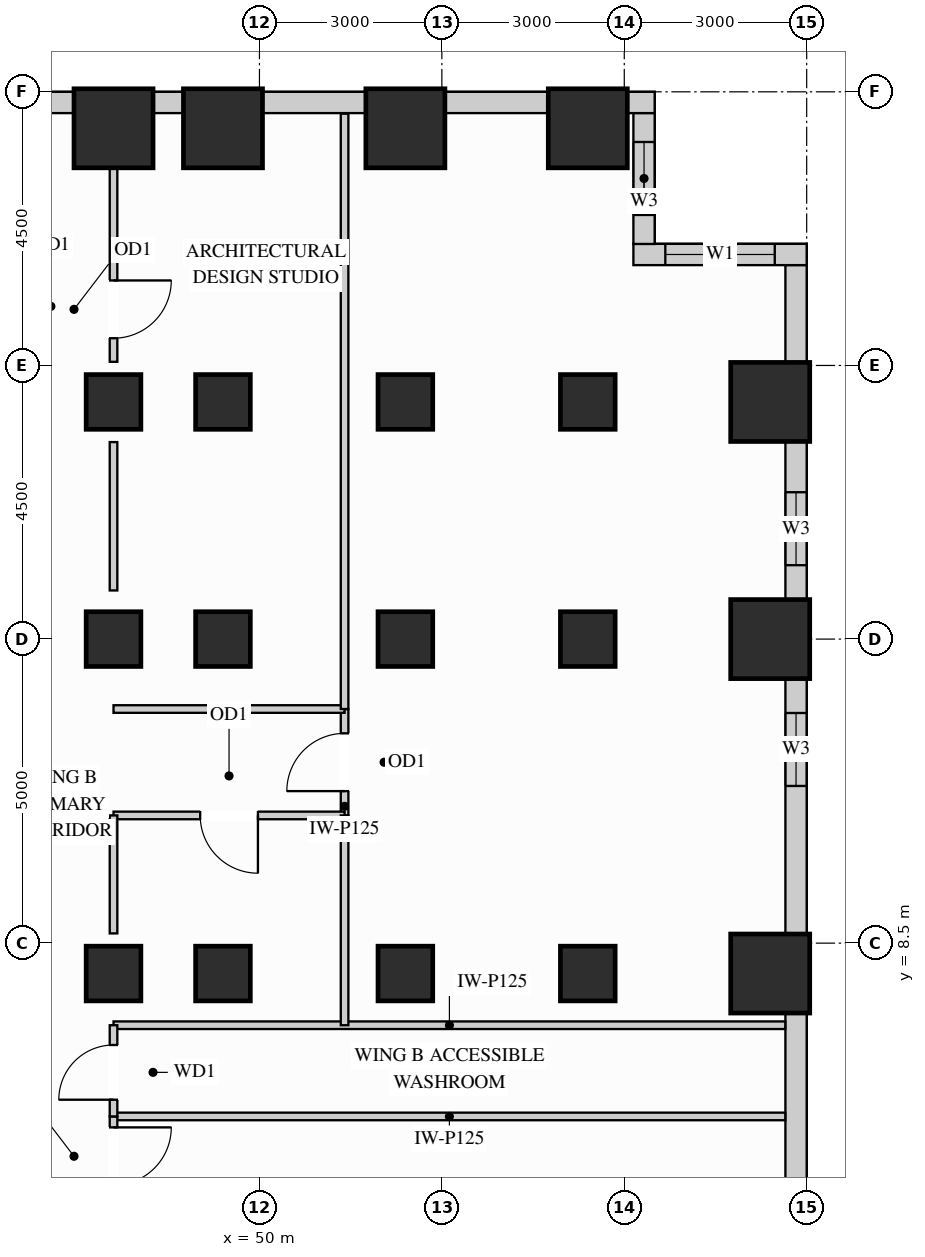
"""IFC4 building model, lengths in metres.
Left out: names, types, materials, properties, quantities, classifications, styles, units other than length and angle.
Written with IfcOpenShell. Run it as: python <this file> out.ifc"""

import sys

from ifc_helpers import new_model, si_unit, direction, frame, frame_2d, origin, origin_2d, place, context, subcontext, project, spatial, rectangle, extrude, source, transform, mapped, element, fill, save


model = new_model("IFC4")
c1 = context("Model", 3, precision=1e-05, world=origin(), true_north=direction((0.0, 1.0)))
c2 = subcontext(c1, "Body", "Model", "MODEL_VIEW")
j1 = project(units=[si_unit("LENGTHUNIT", "METRE"), si_unit("PLANEANGLEUNIT", "RADIAN")], contexts=[c1])
p1 = place(None, origin())
s1 = spatial("IfcSite", under=j1, at=p1, CompositionType="ELEMENT")
p2 = place(p1, origin())
s2 = spatial("IfcBuilding", under=s1, at=p2, CompositionType="ELEMENT")
p3 = place(p2, frame((0.0, 0.0, 26.1)))
s3 = spatial("IfcBuildingStorey", under=s2, at=p3, CompositionType="ELEMENT", Elevation=26.1)
m1 = source(origin(), c2, "Body", "SweptSolid", [
    extrude(rectangle(XDim=0.9, YDim=0.9, at=origin_2d()), origin(), (0.0, 0.0, 1.0), 3.38),
])
for number, where, z_axis, x_axis in (
    (1, (47.6, 13.5, 0.0), (0.0, 0.0, 1.0), (1.0, 0.0, 0.0)),
    (2, (47.6, 8.0, 0.0), (0.0, 0.0, 1.0), (1.0, 0.0, 0.0)),
    (3, (47.6, 17.4, 0.0), (0.0, 0.0, 1.0), (1.0, 0.0, 0.0)),
    (4, (49.4, 13.5, 0.0), (0.0, 0.0, 1.0), (1.0, 0.0, 0.0)),
    (5, (49.4, 17.4, 0.0), (0.0, 0.0, 1.0), (1.0, 0.0, 0.0)),
    (6, (49.4, 8.0, 0.0), (0.0, 0.0, 1.0), (1.0, 0.0, 0.0)),
    (7, (52.4, 13.5, 0.0), (0.0, 0.0, 1.0), (1.0, 0.0, 0.0)),
    (8, (52.4, 17.4, 0.0), (0.0, 0.0, 1.0), (1.0, 0.0, 0.0)),
    (9, (52.4, 8.0, 0.0), (0.0, 0.0, 1.0), (1.0, 0.0, 0.0)),
    (10, (55.4, 13.5, 0.0), (0.0, 0.0, 1.0), (1.0, 0.0, 0.0)),
    (11, (55.4, 17.4, 0.0), (0.0, 0.0, 1.0), (1.0, 0.0, 0.0)),
    (12, (55.4, 8.0, 0.0), (0.0, 0.0, 1.0), (1.0, 0.0, 0.0)),
):
    element("IfcColumn", number, at=place(p3, frame(where, z_axis=z_axis, x_axis=x_axis)), inside=s3, PredefinedType="COLUMN", context=c2, shape_type="MappedRepresentation", body=[
        mapped(m1, transform((0.0, 0.0, 0.0), x_axis=(1.0, 0.0, 0.0), y_axis=(0.0, 1.0, 0.0), z_axis=(0.0, 0.0, 1.0))),
    ])
m2 = source(origin(), c2, "Body", "SweptSolid", [
    extrude(rectangle(XDim=1.3, YDim=1.3, at=origin_2d()), origin(), (0.0, 0.0, 1.0), 3.38),
])
for number, where, z_axis, x_axis in (
    (13, (47.6, 21.9, 0.0), (0.0, 0.0, 1.0), (1.0, 0.0, 0.0)),
    (14, (49.4, 21.9, 0.0), (0.0, 0.0, 1.0), (1.0, 0.0, 0.0)),
    (15, (52.4, 21.9, 0.0), (0.0, 0.0, 1.0), (1.0, 0.0, 0.0)),
    (16, (55.4, 21.9, 0.0), (0.0, 0.0, 1.0), (1.0, 0.0, 0.0)),
    (17, (58.4, 13.5, 0.0), (0.0, 0.0, 1.0), (1.0, 0.0, 0.0)),
    (18, (58.4, 17.4, 0.0), (0.0, 0.0, 1.0), (1.0, 0.0, 0.0)),
    (19, (58.4, 8.0, 0.0), (0.0, 0.0, 1.0), (1.0, 0.0, 0.0)),
):
    element("IfcColumn", number, at=place(p3, frame(where, z_axis=z_axis, x_axis=x_axis)), inside=s3, PredefinedType="COLUMN", context=c2, shape_type="MappedRepresentation", body=[
        mapped(m2, transform((0.0, 0.0, 0.0), x_axis=(1.0, 0.0, 0.0), y_axis=(0.0, 1.0, 0.0), z_axis=(0.0, 0.0, 1.0))),
    ])
m3 = source(origin(), c2, "Body", "SweptSolid", [
    extrude(rectangle(XDim=3.204, YDim=0.35, at=frame_2d((1.602, 0.0))), origin(), (0.0, 0.0, 1.0), 2.51),
])
p4 = place(p3, frame((58.825, 4.148, 0.0), z_axis=(0.0, 0.0, 1.0), x_axis=(0.0, 1.0, 0.0)))
e20 = element("IfcWall", 20, at=p4, inside=s3, PredefinedType="SOLIDWALL", context=c2, shape_type="MappedRepresentation", body=[
    mapped(m3, transform((0.0, 0.0, 0.0), x_axis=(1.0, 0.0, 0.0), y_axis=(0.0, 1.0, 0.0), z_axis=(0.0, 0.0, 1.0))),
])
p5 = place(p3, frame((58.825, 8.648, 0.0), z_axis=(0.0, 0.0, 1.0), x_axis=(0.0, 1.0, 0.0)))
e21 = element("IfcWall", 21, at=p5, inside=s3, PredefinedType="SOLIDWALL", context=c2, shape_type="SweptSolid", body=[
    extrude(rectangle(XDim=4.204, YDim=0.35, at=frame_2d((2.102, 0.0))), origin(), (0.0, 0.0, 1.0), 2.51),
])
p6 = place(p5, frame((2.437, 0.0, 0.78)))
e22 = element("IfcOpeningElement", 22, at=p6, cuts=e21, PredefinedType="OPENING", context=c2, shape_type="SweptSolid", body=[
    extrude(rectangle(XDim=1.2, YDim=1.55, at=frame_2d((0.6, 0.775))), frame((0.0, 0.185, 0.0), z_axis=(0.0, -1.0, 0.0), x_axis=(1.0, 0.0, 0.0)), (0.0, 0.0, 1.0), 0.37),
])
p7 = place(p3, frame((58.825, 14.148, 0.0), z_axis=(0.0, 0.0, 1.0), x_axis=(0.0, 1.0, 0.0)))
e23 = element("IfcWall", 23, at=p7, inside=s3, PredefinedType="SOLIDWALL", context=c2, shape_type="SweptSolid", body=[
    extrude(rectangle(XDim=2.604, YDim=0.35, at=frame_2d((1.302, 0.0))), origin(), (0.0, 0.0, 1.0), 2.51),
])
p8 = place(p7, frame((0.567, 0.0, 0.78)))
e24 = element("IfcOpeningElement", 24, at=p8, cuts=e23, PredefinedType="OPENING", context=c2, shape_type="SweptSolid", body=[
    extrude(rectangle(XDim=1.2, YDim=1.55, at=frame_2d((0.6, 0.775))), frame((0.0, 0.185, 0.0), z_axis=(0.0, -1.0, 0.0), x_axis=(1.0, 0.0, 0.0)), (0.0, 0.0, 1.0), 0.37),
])
m4 = source(origin(), c2, "Body", "SweptSolid", [
    extrude(rectangle(XDim=1.604, YDim=0.35, at=frame_2d((0.802, 0.0))), origin(), (0.0, 0.0, 1.0), 3.365),
])
p9 = place(p3, frame((58.825, 18.048, 0.0), z_axis=(0.0, 0.0, 1.0), x_axis=(0.0, 1.0, 0.0)))
e25 = element("IfcWall", 25, at=p9, inside=s3, PredefinedType="SOLIDWALL", context=c2, shape_type="MappedRepresentation", body=[
    mapped(m4, transform((0.0, 0.0, 0.0), x_axis=(1.0, 0.0, 0.0), y_axis=(0.0, 1.0, 0.0), z_axis=(0.0, 0.0, 1.0))),
])
p10 = place(p3, frame((59.0, 19.825, 0.0), z_axis=(0.0, 0.0, 1.0), x_axis=(-1.0, 0.0, 0.0)))
e26 = element("IfcWall", 26, at=p10, inside=s3, PredefinedType="SOLIDWALL", context=c2, shape_type="SweptSolid", body=[
    extrude(rectangle(XDim=2.85, YDim=0.35, at=frame_2d((1.425, 0.0))), origin(), (0.0, 0.0, 1.0), 3.365),
])
p11 = place(p10, frame((0.525, 0.0, 0.78)))
e27 = element("IfcOpeningElement", 27, at=p11, cuts=e26, PredefinedType="OPENING", context=c2, shape_type="SweptSolid", body=[
    extrude(rectangle(XDim=1.8, YDim=2.1, at=frame_2d((0.9, 1.05))), frame((0.0, 0.185, 0.0), z_axis=(0.0, -1.0, 0.0), x_axis=(1.0, 0.0, 0.0)), (0.0, 0.0, 1.0), 0.37),
])
p12 = place(p3, frame((56.325, 19.998, 0.0), z_axis=(0.0, 0.0, 1.0), x_axis=(0.0, 1.0, 0.0)))
e28 = element("IfcWall", 28, at=p12, inside=s3, PredefinedType="SOLIDWALL", context=c2, shape_type="SweptSolid", body=[
    extrude(rectangle(XDim=2.154, YDim=0.35, at=frame_2d((1.077, 0.0))), origin(), (0.0, 0.0, 1.0), 3.365),
])
p13 = place(p12, frame((0.477, 0.0, 0.78)))
e29 = element("IfcOpeningElement", 29, at=p13, cuts=e28, PredefinedType="OPENING", context=c2, shape_type="SweptSolid", body=[
    extrude(rectangle(XDim=1.2, YDim=2.1, at=frame_2d((0.6, 1.05))), frame((0.0, 0.185, 0.0), z_axis=(0.0, -1.0, 0.0), x_axis=(1.0, 0.0, 0.0)), (0.0, 0.0, 1.0), 0.37),
])
m5 = source(origin(), c2, "Body", "SweptSolid", [
    extrude(rectangle(XDim=0.452, YDim=0.35, at=frame_2d((0.226, 0.0))), origin(), (0.0, 0.0, 1.0), 3.365),
])
p14 = place(p3, frame((56.5, 22.325, 0.0), z_axis=(0.0, 0.0, 1.0), x_axis=(-1.0, 0.0, 0.0)))
e30 = element("IfcWall", 30, at=p14, inside=s3, PredefinedType="SOLIDWALL", context=c2, shape_type="MappedRepresentation", body=[
    mapped(m5, transform((0.0, 0.0, 0.0), x_axis=(1.0, 0.0, 0.0), y_axis=(0.0, 1.0, 0.0), z_axis=(0.0, 0.0, 1.0))),
])
m6 = source(origin(), c2, "Body", "SweptSolid", [
    extrude(rectangle(XDim=1.704, YDim=0.35, at=frame_2d((0.852, 0.0))), origin(), (0.0, 0.0, 1.0), 2.51),
])
for number, where, z_axis, x_axis in (
    (31, (54.752, 22.325, 0.0), (0.0, 0.0, 1.0), (-1.0, 0.0, 0.0)),
    (32, (51.752, 22.325, 0.0), (0.0, 0.0, 1.0), (-1.0, 0.0, 0.0)),
):
    element("IfcWall", number, at=place(p3, frame(where, z_axis=z_axis, x_axis=x_axis)), inside=s3, PredefinedType="SOLIDWALL", context=c2, shape_type="MappedRepresentation", body=[
        mapped(m6, transform((0.0, 0.0, 0.0), x_axis=(1.0, 0.0, 0.0), y_axis=(0.0, 1.0, 0.0), z_axis=(0.0, 0.0, 1.0))),
    ])
m7 = source(origin(), c2, "Body", "SweptSolid", [
    extrude(rectangle(XDim=0.504, YDim=0.35, at=frame_2d((0.252, 0.0))), origin(), (0.0, 0.0, 1.0), 3.365),
])
p15 = place(p3, frame((48.752, 22.325, 0.0), z_axis=(0.0, 0.0, 1.0), x_axis=(-1.0, 0.0, 0.0)))
e33 = element("IfcWall", 33, at=p15, inside=s3, PredefinedType="SOLIDWALL", context=c2, shape_type="MappedRepresentation", body=[
    mapped(m7, transform((0.0, 0.0, 0.0), x_axis=(1.0, 0.0, 0.0), y_axis=(0.0, 1.0, 0.0), z_axis=(0.0, 0.0, 1.0))),
])
p16 = place(p3, frame((46.952, 22.325, 0.0), z_axis=(0.0, 0.0, 1.0), x_axis=(-1.0, 0.0, 0.0)))
e34 = element("IfcWall", 34, at=p16, inside=s3, PredefinedType="SOLIDWALL", context=c2, shape_type="SweptSolid", body=[
    extrude(rectangle(XDim=6.304, YDim=0.35, at=frame_2d((3.152, 0.0))), origin(), (0.0, 0.0, 1.0), 2.51),
])
p17 = place(p16, frame((1.649, 0.0, 0.78)))
e35 = element("IfcOpeningElement", 35, at=p17, cuts=e34, PredefinedType="OPENING", context=c2, shape_type="SweptSolid", body=[
    extrude(rectangle(XDim=1.8, YDim=1.55, at=frame_2d((0.9, 0.775))), frame((0.0, 0.185, 0.0), z_axis=(0.0, -1.0, 0.0), x_axis=(1.0, 0.0, 0.0)), (0.0, 0.0, 1.0), 0.37),
])
p18 = place(p16, frame((3.817, 0.0, 0.78)))
e36 = element("IfcOpeningElement", 36, at=p18, cuts=e34, PredefinedType="OPENING", context=c2, shape_type="SweptSolid", body=[
    extrude(rectangle(XDim=1.8, YDim=1.55, at=frame_2d((0.9, 0.775))), frame((0.0, 0.185, 0.0), z_axis=(0.0, -1.0, 0.0), x_axis=(1.0, 0.0, 0.0)), (0.0, 0.0, 1.0), 0.37),
])
p19 = place(p3, frame((51.4, 10.6, 0.0), z_axis=(0.0, 0.0, 1.0), x_axis=(0.0, 1.0, 0.0)))
e37 = element("IfcWall", 37, at=p19, inside=s3, PredefinedType="PARTITIONING", context=c2, shape_type="SweptSolid", body=[
    extrude(rectangle(XDim=1.75, YDim=0.125, at=frame_2d((0.875, 0.0))), origin(), (0.0, 0.0, 1.0), 3.365),
])
p20 = place(p19, frame((0.4, 0.0, 0.0)))
e38 = element("IfcOpeningElement", 38, at=p20, cuts=e37, PredefinedType="OPENING", context=c2, shape_type="SweptSolid", body=[
    extrude(rectangle(XDim=0.95, YDim=2.15, at=frame_2d((0.475, 1.075))), frame((0.0, 0.073, 0.0), z_axis=(0.0, -1.0, 0.0), x_axis=(1.0, 0.0, 0.0)), (0.0, 0.0, 1.0), 0.145),
])
m8 = source(origin(), c2, "Body", "SweptSolid", [
    extrude(rectangle(XDim=11.048, YDim=0.125, at=frame_2d((5.524, 0.0))), origin(), (0.0, 0.0, 1.0), 3.365),
])
for number, where, z_axis, x_axis in (
    (39, (47.6, 5.65, 0.0), (0.0, 0.0, 1.0), (1.0, 0.0, 0.0)),
    (40, (47.6, 7.15, 0.0), (0.0, 0.0, 1.0), (1.0, 0.0, 0.0)),
):
    element("IfcWall", number, at=place(p3, frame(where, z_axis=z_axis, x_axis=x_axis)), inside=s3, PredefinedType="PARTITIONING", context=c2, shape_type="MappedRepresentation", body=[
        mapped(m8, transform((0.0, 0.0, 0.0), x_axis=(1.0, 0.0, 0.0), y_axis=(0.0, 1.0, 0.0), z_axis=(0.0, 0.0, 1.0))),
    ])
m9 = source(origin(), c2, "Body", "SweptSolid", [
    extrude(rectangle(XDim=3.8, YDim=0.125, at=frame_2d((1.9, 0.0))), origin(), (0.0, 0.0, 1.0), 3.365),
])
p21 = place(p3, frame((47.6, 12.35, 0.0), z_axis=(0.0, 0.0, 1.0), x_axis=(1.0, 0.0, 0.0)))
e41 = element("IfcWall", 41, at=p21, inside=s3, PredefinedType="PARTITIONING", context=c2, shape_type="MappedRepresentation", body=[
    mapped(m9, transform((0.0, 0.0, 0.0), x_axis=(1.0, 0.0, 0.0), y_axis=(0.0, 1.0, 0.0), z_axis=(0.0, 0.0, 1.0))),
])
p22 = place(p3, frame((47.6, 10.6, 0.0), z_axis=(0.0, 0.0, 1.0), x_axis=(1.0, 0.0, 0.0)))
e42 = element("IfcWall", 42, at=p22, inside=s3, PredefinedType="PARTITIONING", context=c2, shape_type="SweptSolid", body=[
    extrude(rectangle(XDim=3.8, YDim=0.125, at=frame_2d((1.9, 0.0))), origin(), (0.0, 0.0, 1.0), 2.67),
])
p23 = place(p22, frame((1.425, 0.0, 0.0)))
e43 = element("IfcOpeningElement", 43, at=p23, cuts=e42, PredefinedType="OPENING", context=c2, shape_type="SweptSolid", body=[
    extrude(rectangle(XDim=0.95, YDim=2.15, at=frame_2d((0.475, 1.075))), frame((0.0, 0.073, 0.0), z_axis=(0.0, -1.0, 0.0), x_axis=(1.0, 0.0, 0.0)), (0.0, 0.0, 1.0), 0.145),
])
m10 = source(origin(), c2, "Body", "SweptSolid", [
    extrude(rectangle(XDim=3.45, YDim=0.125, at=frame_2d((1.725, 0.0))), origin(), (0.0, 0.0, 1.0), 3.365),
])
p24 = place(p3, frame((51.4, 7.15, 0.0), z_axis=(0.0, 0.0, 1.0), x_axis=(0.0, 1.0, 0.0)))
e44 = element("IfcWall", 44, at=p24, inside=s3, PredefinedType="PARTITIONING", context=c2, shape_type="MappedRepresentation", body=[
    mapped(m10, transform((0.0, 0.0, 0.0), x_axis=(1.0, 0.0, 0.0), y_axis=(0.0, 1.0, 0.0), z_axis=(0.0, 0.0, 1.0))),
])
m11 = source(origin(), c2, "Body", "SweptSolid", [
    extrude(rectangle(XDim=9.79, YDim=0.125, at=frame_2d((4.895, 0.0))), origin(), (0.0, 0.0, 1.0), 3.365),
])
p25 = place(p3, frame((51.4, 12.35, 0.0), z_axis=(0.0, 0.0, 1.0), x_axis=(0.0, 1.0, 0.0)))
e45 = element("IfcWall", 45, at=p25, inside=s3, PredefinedType="PARTITIONING", context=c2, shape_type="MappedRepresentation", body=[
    mapped(m11, transform((0.0, 0.0, 0.0), x_axis=(1.0, 0.0, 0.0), y_axis=(0.0, 1.0, 0.0), z_axis=(0.0, 0.0, 1.0))),
])
p26 = place(p3, frame((47.6, 4.16, 0.0), z_axis=(0.0, 0.0, 1.0), x_axis=(0.0, 1.0, 0.0)))
e46 = element("IfcWall", 46, at=p26, inside=s3, PredefinedType="PARTITIONING", context=c2, shape_type="SweptSolid", body=[
    extrude(rectangle(XDim=1.49, YDim=0.125, at=frame_2d((0.745, 0.0))), origin(), (0.0, 0.0, 1.0), 2.67),
])
p27 = place(p26, frame((0.36, 0.0, 0.0)))
e47 = element("IfcOpeningElement", 47, at=p27, cuts=e46, PredefinedType="OPENING", context=c2, shape_type="SweptSolid", body=[
    extrude(rectangle(XDim=0.95, YDim=2.15, at=frame_2d((0.475, 1.075))), frame((0.0, 0.073, 0.0), z_axis=(0.0, -1.0, 0.0), x_axis=(1.0, 0.0, 0.0)), (0.0, 0.0, 1.0), 0.145),
])
m12 = source(origin(), c2, "Body", "SweptSolid", [
    extrude(rectangle(XDim=1.94, YDim=0.125, at=frame_2d((0.97, 0.0))), origin(), (0.0, 0.0, 1.0), 2.67),
])
p28 = place(p3, frame((47.6, 8.66, 0.0), z_axis=(0.0, 0.0, 1.0), x_axis=(0.0, 1.0, 0.0)))
e48 = element("IfcWall", 48, at=p28, inside=s3, PredefinedType="PARTITIONING", context=c2, shape_type="MappedRepresentation", body=[
    mapped(m12, transform((0.0, 0.0, 0.0), x_axis=(1.0, 0.0, 0.0), y_axis=(0.0, 1.0, 0.0), z_axis=(0.0, 0.0, 1.0))),
])
m13 = source(origin(), c2, "Body", "SweptSolid", [
    extrude(rectangle(XDim=2.44, YDim=0.125, at=frame_2d((1.22, 0.0))), origin(), (0.0, 0.0, 1.0), 2.67),
])
p29 = place(p3, frame((47.6, 14.3, 0.0), z_axis=(0.0, 0.0, 1.0), x_axis=(0.0, 1.0, 0.0)))
e49 = element("IfcWall", 49, at=p29, inside=s3, PredefinedType="PARTITIONING", context=c2, shape_type="MappedRepresentation", body=[
    mapped(m13, transform((0.0, 0.0, 0.0), x_axis=(1.0, 0.0, 0.0), y_axis=(0.0, 1.0, 0.0), z_axis=(0.0, 0.0, 1.0))),
])
p30 = place(p3, frame((47.6, 18.06, 0.0), z_axis=(0.0, 0.0, 1.0), x_axis=(0.0, 1.0, 0.0)))
e50 = element("IfcWall", 50, at=p30, inside=s3, PredefinedType="PARTITIONING", context=c2, shape_type="SweptSolid", body=[
    extrude(rectangle(XDim=3.18, YDim=0.125, at=frame_2d((1.59, 0.0))), origin(), (0.0, 0.0, 1.0), 2.67),
])
p31 = place(p30, frame((0.388, 0.0, 0.0)))
e51 = element("IfcOpeningElement", 51, at=p31, cuts=e50, PredefinedType="OPENING", context=c2, shape_type="SweptSolid", body=[
    extrude(rectangle(XDim=0.95, YDim=2.15, at=frame_2d((0.475, 1.075))), frame((0.0, 0.073, 0.0), z_axis=(0.0, -1.0, 0.0), x_axis=(1.0, 0.0, 0.0)), (0.0, 0.0, 1.0), 0.145),
])
p32 = place(p3, frame((47.6, 5.65, 0.0), z_axis=(0.0, 0.0, 1.0), x_axis=(0.0, 1.0, 0.0)))
e52 = element("IfcWall", 52, at=p32, inside=s3, PredefinedType="PARTITIONING", context=c2, shape_type="SweptSolid", body=[
    extrude(rectangle(XDim=1.5, YDim=0.125, at=frame_2d((0.75, 0.0))), origin(), (0.0, 0.0, 1.0), 2.67),
])
p33 = place(p32, frame((0.275, 0.0, 0.0)))
e53 = element("IfcOpeningElement", 53, at=p33, cuts=e52, PredefinedType="OPENING", context=c2, shape_type="SweptSolid", body=[
    extrude(rectangle(XDim=0.9, YDim=2.15, at=frame_2d((0.45, 1.075))), frame((0.0, 0.073, 0.0), z_axis=(0.0, -1.0, 0.0), x_axis=(1.0, 0.0, 0.0)), (0.0, 0.0, 1.0), 0.145),
])
m14 = source(origin(), c2, "Body", "SweptSolid", [
    extrude(rectangle(XDim=0.95, YDim=2.15, at=frame_2d((0.475, 1.075))), frame((0.0, 0.025, 0.0), z_axis=(0.0, -1.0, 0.0), x_axis=(1.0, 0.0, 0.0)), (0.0, 0.0, 1.0), 0.05),
])
p34 = place(p27, origin())
e54 = element("IfcDoor", 54, at=p34, inside=s3, OperationType="SINGLE_SWING_RIGHT", PredefinedType="DOOR", context=c2, shape_type="MappedRepresentation", body=[
    mapped(m14, transform((0.0, 0.0, 0.0), x_axis=(1.0, 0.0, 0.0), y_axis=(0.0, 1.0, 0.0), z_axis=(0.0, 0.0, 1.0))),
])
fill(e47, e54)
p35 = place(p23, origin())
e55 = element("IfcDoor", 55, at=p35, inside=s3, OperationType="SINGLE_SWING_RIGHT", PredefinedType="DOOR", context=c2, shape_type="MappedRepresentation", body=[
    mapped(m14, transform((0.0, 0.0, 0.0), x_axis=(1.0, 0.0, 0.0), y_axis=(0.0, 1.0, 0.0), z_axis=(0.0, 0.0, 1.0))),
])
fill(e43, e55)
p36 = place(p20, origin())
e56 = element("IfcDoor", 56, at=p36, inside=s3, OperationType="SINGLE_SWING_LEFT", PredefinedType="DOOR", context=c2, shape_type="MappedRepresentation", body=[
    mapped(m14, transform((0.0, 0.0, 0.0), x_axis=(1.0, 0.0, 0.0), y_axis=(0.0, 1.0, 0.0), z_axis=(0.0, 0.0, 1.0))),
])
fill(e38, e56)
p37 = place(p31, origin())
e57 = element("IfcDoor", 57, at=p37, inside=s3, OperationType="SINGLE_SWING_RIGHT", PredefinedType="DOOR", context=c2, shape_type="MappedRepresentation", body=[
    mapped(m14, transform((0.0, 0.0, 0.0), x_axis=(1.0, 0.0, 0.0), y_axis=(0.0, 1.0, 0.0), z_axis=(0.0, 0.0, 1.0))),
])
fill(e51, e57)
m15 = source(origin(), c2, "Body", "SweptSolid", [
    extrude(rectangle(XDim=0.9, YDim=2.15, at=frame_2d((0.45, 1.075))), frame((0.0, 0.025, 0.0), z_axis=(0.0, -1.0, 0.0), x_axis=(1.0, 0.0, 0.0)), (0.0, 0.0, 1.0), 0.05),
])
p38 = place(p33, origin())
e58 = element("IfcDoor", 58, at=p38, inside=s3, OperationType="SINGLE_SWING_LEFT", PredefinedType="DOOR", context=c2, shape_type="MappedRepresentation", body=[
    mapped(m15, transform((0.0, 0.0, 0.0), x_axis=(1.0, 0.0, 0.0), y_axis=(0.0, 1.0, 0.0), z_axis=(0.0, 0.0, 1.0))),
])
fill(e53, e58)
m16 = source(origin(), c2, "Body", "SweptSolid", [
    extrude(rectangle(XDim=1.8, YDim=2.1, at=frame_2d((0.9, 1.05))), frame((0.0, 0.03, 0.0), z_axis=(0.0, -1.0, 0.0), x_axis=(1.0, 0.0, 0.0)), (0.0, 0.0, 1.0), 0.06),
])
p39 = place(p11, origin())
e59 = element("IfcWindow", 59, at=p39, inside=s3, PartitioningType="SINGLE_PANEL", PredefinedType="WINDOW", context=c2, shape_type="MappedRepresentation", body=[
    mapped(m16, transform((0.0, 0.0, 0.0), x_axis=(1.0, 0.0, 0.0), y_axis=(0.0, 1.0, 0.0), z_axis=(0.0, 0.0, 1.0))),
])
fill(e27, e59)
m17 = source(origin(), c2, "Body", "SweptSolid", [
    extrude(rectangle(XDim=1.2, YDim=1.55, at=frame_2d((0.6, 0.775))), frame((0.0, 0.03, 0.0), z_axis=(0.0, -1.0, 0.0), x_axis=(1.0, 0.0, 0.0)), (0.0, 0.0, 1.0), 0.06),
])
p40 = place(p6, origin())
e60 = element("IfcWindow", 60, at=p40, inside=s3, PartitioningType="SINGLE_PANEL", PredefinedType="WINDOW", context=c2, shape_type="MappedRepresentation", body=[
    mapped(m17, transform((0.0, 0.0, 0.0), x_axis=(1.0, 0.0, 0.0), y_axis=(0.0, 1.0, 0.0), z_axis=(0.0, 0.0, 1.0))),
])
fill(e22, e60)
p41 = place(p8, origin())
e61 = element("IfcWindow", 61, at=p41, inside=s3, PartitioningType="SINGLE_PANEL", PredefinedType="WINDOW", context=c2, shape_type="MappedRepresentation", body=[
    mapped(m17, transform((0.0, 0.0, 0.0), x_axis=(1.0, 0.0, 0.0), y_axis=(0.0, 1.0, 0.0), z_axis=(0.0, 0.0, 1.0))),
])
fill(e24, e61)
m18 = source(origin(), c2, "Body", "SweptSolid", [
    extrude(rectangle(XDim=1.2, YDim=2.1, at=frame_2d((0.6, 1.05))), frame((0.0, 0.03, 0.0), z_axis=(0.0, -1.0, 0.0), x_axis=(1.0, 0.0, 0.0)), (0.0, 0.0, 1.0), 0.06),
])
p42 = place(p13, origin())
e62 = element("IfcWindow", 62, at=p42, inside=s3, PartitioningType="SINGLE_PANEL", PredefinedType="WINDOW", context=c2, shape_type="MappedRepresentation", body=[
    mapped(m18, transform((0.0, 0.0, 0.0), x_axis=(1.0, 0.0, 0.0), y_axis=(0.0, 1.0, 0.0), z_axis=(0.0, 0.0, 1.0))),
])
fill(e29, e62)
save(model, sys.argv[1])
